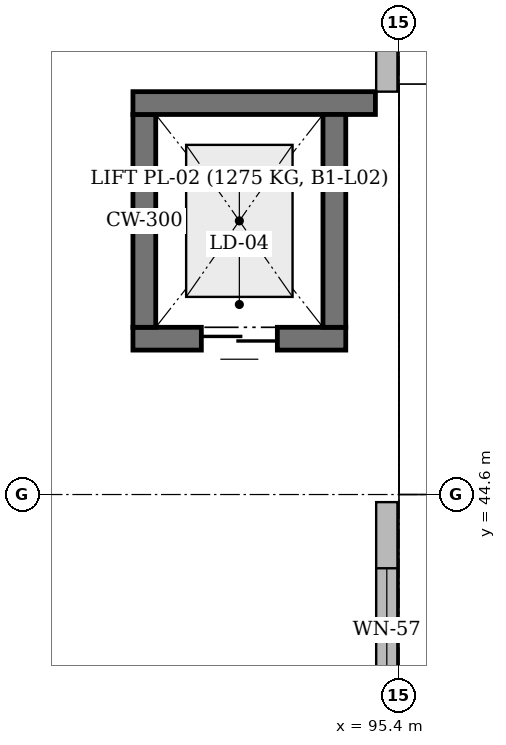
"""IFC4 building model, lengths in metres.
Left out: names, types, materials, properties, quantities, classifications, styles, units other than length and angle.
Written with IfcOpenShell. Run it as: python <this file> out.ifc"""

import sys

from ifc_helpers import new_model, si_unit, direction, frame, frame_2d, origin, place, context, subcontext, project, spatial, rectangle, extrude, element, fill, save


model = new_model("IFC4")
c1 = context("Model", 3, precision=1e-05, world=origin(), true_north=direction((0.0, 1.0)))
c2 = subcontext(c1, "Body", "Model", "MODEL_VIEW")
j1 = project(units=[si_unit("LENGTHUNIT", "METRE"), si_unit("PLANEANGLEUNIT", "RADIAN")], contexts=[c1])
p1 = place(None, origin())
s1 = spatial("IfcSite", under=j1, at=p1, CompositionType="ELEMENT")
p2 = place(p1, origin())
s2 = spatial("IfcBuilding", under=s1, at=p2, CompositionType="ELEMENT")
p3 = place(p2, frame((0.0, 0.0, 4.8)))
s3 = spatial("IfcBuildingStorey", under=s2, at=p3, CompositionType="ELEMENT", Elevation=4.8)
p4 = place(p3, frame((94.7, 46.65, 0.0), z_axis=(0.0, 0.0, 1.0), x_axis=(-1.0, 0.0, 0.0)))
e1 = element("IfcWall", 1, at=p4, inside=s3, PredefinedType="SOLIDWALL", context=c2, shape_type="SweptSolid", body=[
    extrude(rectangle(XDim=2.8, YDim=0.3, at=frame_2d((1.4, 0.0))), origin(), (0.0, 0.0, 1.0), 4.2),
])
p5 = place(p4, frame((0.9, 0.0, 0.0)))
e2 = element("IfcOpeningElement", 2, at=p5, cuts=e1, PredefinedType="OPENING", context=c2, shape_type="SweptSolid", body=[
    extrude(rectangle(XDim=1.0, YDim=2.1, at=frame_2d((0.5, 1.05))), frame((0.0, 0.17, 0.0), z_axis=(0.0, -1.0, 0.0), x_axis=(1.0, 0.0, 0.0)), (0.0, 0.0, 1.0), 0.34),
])
p6 = place(p3, frame((92.05, 46.8, 0.0), z_axis=(0.0, 0.0, 1.0), x_axis=(0.0, 1.0, 0.0)))
e3 = element("IfcWall", 3, at=p6, inside=s3, PredefinedType="SOLIDWALL", context=c2, shape_type="SweptSolid", body=[
    extrude(rectangle(XDim=2.8, YDim=0.3, at=frame_2d((1.4, 0.0))), origin(), (0.0, 0.0, 1.0), 4.2),
])
p7 = place(p3, frame((91.9, 49.75, 0.0), z_axis=(0.0, 0.0, 1.0), x_axis=(1.0, 0.0, 0.0)))
e4 = element("IfcWall", 4, at=p7, inside=s3, PredefinedType="SOLIDWALL", context=c2, shape_type="SweptSolid", body=[
    extrude(rectangle(XDim=3.19, YDim=0.3, at=frame_2d((1.595, 0.0))), origin(), (0.0, 0.0, 1.0), 4.2),
])
p8 = place(p3, frame((94.55, 49.6, 0.0), z_axis=(0.0, 0.0, 1.0), x_axis=(0.0, -1.0, 0.0)))
e5 = element("IfcWall", 5, at=p8, inside=s3, PredefinedType="SOLIDWALL", context=c2, shape_type="SweptSolid", body=[
    extrude(rectangle(XDim=2.8, YDim=0.3, at=frame_2d((1.4, 0.0))), origin(), (0.0, 0.0, 1.0), 4.2),
])
p9 = place(p3, frame((95.24, 37.78, 0.0), z_axis=(0.0, 0.0, 1.0), x_axis=(0.0, 1.0, 0.0)))
e6 = element("IfcWall", 6, at=p9, inside=s3, PredefinedType="SOLIDWALL", context=c2, shape_type="SweptSolid", body=[
    extrude(rectangle(XDim=6.72, YDim=0.28, at=frame_2d((3.36, 0.0))), origin(), (0.0, 0.0, 1.0), 3.373),
])
p10 = place(p9, frame((0.87, 0.0, 0.95)))
e7 = element("IfcOpeningElement", 7, at=p10, cuts=e6, PredefinedType="OPENING", context=c2, shape_type="SweptSolid", body=[
    extrude(rectangle(XDim=1.62, YDim=1.75, at=frame_2d((0.81, 0.875))), frame((0.0, 0.16, 0.0), z_axis=(0.0, -1.0, 0.0), x_axis=(1.0, 0.0, 0.0)), (0.0, 0.0, 1.0), 0.32),
])
p11 = place(p9, frame((4.23, 0.0, 0.95)))
e8 = element("IfcOpeningElement", 8, at=p11, cuts=e6, PredefinedType="OPENING", context=c2, shape_type="SweptSolid", body=[
    extrude(rectangle(XDim=1.62, YDim=1.75, at=frame_2d((0.81, 0.875))), frame((0.0, 0.16, 0.0), z_axis=(0.0, -1.0, 0.0), x_axis=(1.0, 0.0, 0.0)), (0.0, 0.0, 1.0), 0.32),
])
p12 = place(p3, frame((95.24, 49.9, 0.0), z_axis=(0.0, 0.0, 1.0), x_axis=(0.0, 1.0, 0.0)))
e9 = element("IfcWall", 9, at=p12, inside=s3, PredefinedType="SOLIDWALL", context=c2, shape_type="SweptSolid", body=[
    extrude(rectangle(XDim=1.95, YDim=0.28, at=frame_2d((0.975, 0.0))), origin(), (0.0, 0.0, 1.0), 3.373),
])
p13 = place(p5, origin())
e10 = element("IfcDoor", 10, at=p13, inside=s3, OperationType="DOUBLE_DOOR_SLIDING", PredefinedType="DOOR", context=c2, shape_type="SweptSolid", body=[
    extrude(rectangle(XDim=1.0, YDim=2.1, at=frame_2d((0.5, 1.05))), frame((0.0, 0.025, 0.0), z_axis=(0.0, -1.0, 0.0), x_axis=(1.0, 0.0, 0.0)), (0.0, 0.0, 1.0), 0.05),
])
fill(e2, e10)
p14 = place(p11, origin())
e11 = element("IfcWindow", 11, at=p14, inside=s3, PartitioningType="SINGLE_PANEL", PredefinedType="WINDOW", context=c2, shape_type="SweptSolid", body=[
    extrude(rectangle(XDim=1.62, YDim=1.75, at=frame_2d((0.81, 0.875))), frame((0.0, 0.03, 0.0), z_axis=(0.0, -1.0, 0.0), x_axis=(1.0, 0.0, 0.0)), (0.0, 0.0, 1.0), 0.06),
])
fill(e8, e11)
save(model, sys.argv[1])
